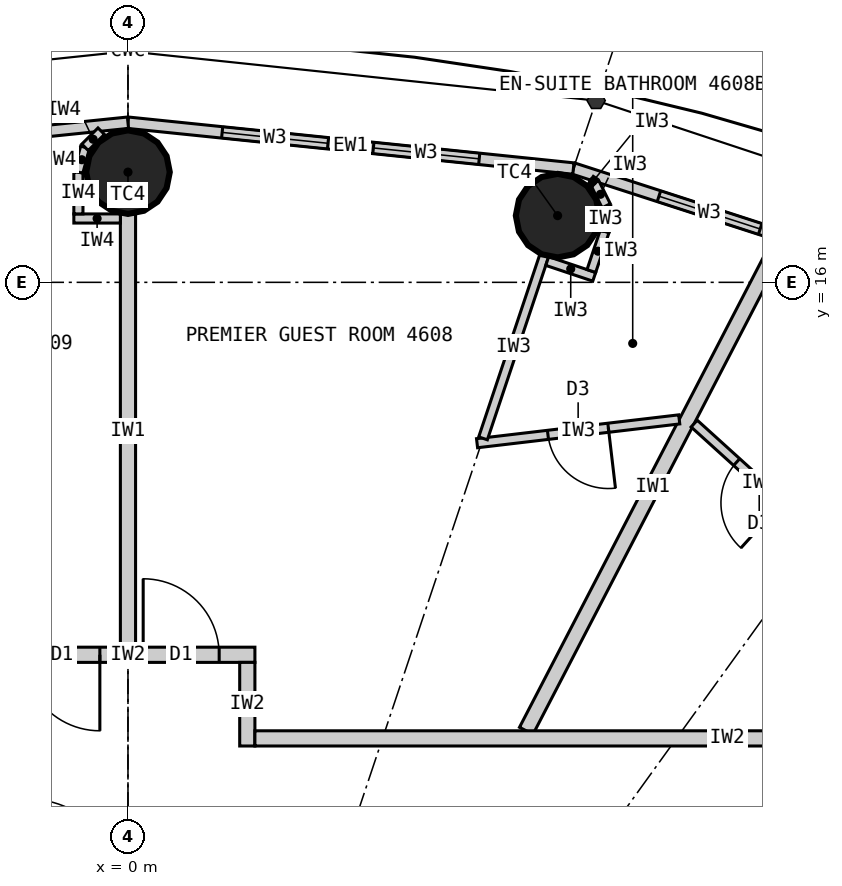
"""IFC4 building model, lengths in metres.
Left out: names, types, materials, properties, quantities, classifications, styles, units other than length and angle.
Written with IfcOpenShell. Run it as: python <this file> out.ifc"""

import sys

from ifc_helpers import new_model, si_unit, direction, frame, frame_2d, origin, origin_2d, place, context, subcontext, project, spatial, rectangle, circle, extrude, element, fill, save


model = new_model("IFC4")
c1 = context("Model", 3, precision=1e-05, world=origin(), true_north=direction((0.0, 1.0)))
c2 = subcontext(c1, "Body", "Model", "MODEL_VIEW")
j1 = project(units=[si_unit("LENGTHUNIT", "METRE"), si_unit("PLANEANGLEUNIT", "RADIAN")], contexts=[c1])
p1 = place(None, origin())
s1 = spatial("IfcSite", under=j1, at=p1, CompositionType="ELEMENT")
p2 = place(p1, origin())
s2 = spatial("IfcBuilding", under=s1, at=p2, CompositionType="ELEMENT")
p3 = place(p2, frame((0.0, 0.0, 173.1)))
s3 = spatial("IfcBuildingStorey", under=s2, at=p3, CompositionType="ELEMENT", Elevation=173.1)
for number, where, z_axis, x_axis in (
    (1, (5.653, 16.877, 0.0), (0.0, 0.0, 1.0), (1.0, 0.0, 0.0)),
    (2, (0.0, 17.45, 0.0), (0.0, 0.0, 1.0), (1.0, 0.0, 0.0)),
):
    element("IfcColumn", number, at=place(p3, frame(where, z_axis=z_axis, x_axis=x_axis)), inside=s3, PredefinedType="COLUMN", context=c2, shape_type="SweptSolid", body=[
        extrude(circle(Radius=0.55, at=origin_2d()), origin(), (0.0, 0.0, 1.0), 3.3),
    ])
p4 = place(p3, frame((11.346, 15.722, 0.0), z_axis=(0.0, 0.0, 1.0), x_axis=(-0.951432482129, 0.307857486429, 0.0)))
e3 = element("IfcWall", 3, at=p4, inside=s3, PredefinedType="ELEMENTEDWALL", context=c2, shape_type="SweptSolid", body=[
    extrude(rectangle(XDim=5.766, YDim=0.15, at=frame_2d((2.883, 0.0))), origin(), (0.0, 0.0, 1.0), 3.12),
])
p5 = place(p4, frame((1.183, 0.0, 0.9)))
e4 = element("IfcOpeningElement", 4, at=p5, cuts=e3, PredefinedType="OPENING", context=c2, shape_type="SweptSolid", body=[
    extrude(rectangle(XDim=1.4, YDim=1.9, at=frame_2d((0.7, 0.95))), frame((0.0, 0.085, 0.0), z_axis=(0.0, -1.0, 0.0), x_axis=(1.0, 0.0, 0.0)), (0.0, 0.0, 1.0), 0.17),
])
p6 = place(p4, frame((3.183, 0.0, 0.9)))
e5 = element("IfcOpeningElement", 5, at=p6, cuts=e3, PredefinedType="OPENING", context=c2, shape_type="SweptSolid", body=[
    extrude(rectangle(XDim=1.4, YDim=1.9, at=frame_2d((0.7, 0.95))), frame((0.0, 0.085, 0.0), z_axis=(0.0, -1.0, 0.0), x_axis=(1.0, 0.0, 0.0)), (0.0, 0.0, 1.0), 0.17),
])
p7 = place(p3, frame((5.86, 17.497, 0.0), z_axis=(0.0, 0.0, 1.0), x_axis=(-0.994751738032, 0.102318032045, 0.0)))
e6 = element("IfcWall", 6, at=p7, inside=s3, PredefinedType="ELEMENTEDWALL", context=c2, shape_type="SweptSolid", body=[
    extrude(rectangle(XDim=5.891, YDim=0.15, at=frame_2d((2.946, 0.0))), origin(), (0.0, 0.0, 1.0), 3.12),
])
p8 = place(p7, frame((1.246, 0.0, 0.9)))
e7 = element("IfcOpeningElement", 7, at=p8, cuts=e6, PredefinedType="OPENING", context=c2, shape_type="SweptSolid", body=[
    extrude(rectangle(XDim=1.4, YDim=1.9, at=frame_2d((0.7, 0.95))), frame((0.0, 0.085, 0.0), z_axis=(0.0, -1.0, 0.0), x_axis=(1.0, 0.0, 0.0)), (0.0, 0.0, 1.0), 0.17),
])
p9 = place(p7, frame((3.246, 0.0, 0.9)))
e8 = element("IfcOpeningElement", 8, at=p9, cuts=e6, PredefinedType="OPENING", context=c2, shape_type="SweptSolid", body=[
    extrude(rectangle(XDim=1.4, YDim=1.9, at=frame_2d((0.7, 0.95))), frame((0.0, 0.085, 0.0), z_axis=(0.0, -1.0, 0.0), x_axis=(1.0, 0.0, 0.0)), (0.0, 0.0, 1.0), 0.17),
])
p10 = place(p3, frame((0.0, 18.1, 0.0), z_axis=(0.0, 0.0, 1.0), x_axis=(-0.994751738032, -0.102318032045, 0.0)))
e9 = element("IfcWall", 9, at=p10, inside=s3, PredefinedType="ELEMENTEDWALL", context=c2, shape_type="SweptSolid", body=[
    extrude(rectangle(XDim=5.891, YDim=0.15, at=frame_2d((2.946, 0.0))), origin(), (0.0, 0.0, 1.0), 3.12),
])
p11 = place(p10, frame((1.246, 0.0, 0.9)))
e10 = element("IfcOpeningElement", 10, at=p11, cuts=e9, PredefinedType="OPENING", context=c2, shape_type="SweptSolid", body=[
    extrude(rectangle(XDim=1.4, YDim=1.9, at=frame_2d((0.7, 0.95))), frame((0.0, 0.085, 0.0), z_axis=(0.0, -1.0, 0.0), x_axis=(1.0, 0.0, 0.0)), (0.0, 0.0, 1.0), 0.17),
])
p12 = place(p10, frame((3.246, 0.0, 0.9)))
e11 = element("IfcOpeningElement", 11, at=p12, cuts=e9, PredefinedType="OPENING", context=c2, shape_type="SweptSolid", body=[
    extrude(rectangle(XDim=1.4, YDim=1.9, at=frame_2d((0.7, 0.95))), frame((0.0, 0.085, 0.0), z_axis=(0.0, -1.0, 0.0), x_axis=(1.0, 0.0, 0.0)), (0.0, 0.0, 1.0), 0.17),
])
p13 = place(p3, frame((5.24, 10.1, 0.0), z_axis=(0.0, 0.0, 1.0), x_axis=(0.460532965373, 0.887642601391, 0.0)))
e12 = element("IfcWall", 12, at=p13, inside=s3, PredefinedType="PARTITIONING", context=c2, shape_type="SweptSolid", body=[
    extrude(rectangle(XDim=7.231, YDim=0.2, at=frame_2d((3.616, 0.0))), origin(), (0.0, 0.0, 1.0), 3.12),
])
p14 = place(p3, frame((0.0, 11.2, 0.0), z_axis=(0.0, 0.0, 1.0), x_axis=(0.0, 1.0, 0.0)))
e13 = element("IfcWall", 13, at=p14, inside=s3, PredefinedType="PARTITIONING", context=c2, shape_type="SweptSolid", body=[
    extrude(rectangle(XDim=5.7, YDim=0.2, at=frame_2d((2.85, 0.0))), origin(), (0.0, 0.0, 1.0), 2.42),
])
p15 = place(p3, frame((-1.67, 11.1, 0.0), z_axis=(0.0, 0.0, 1.0), x_axis=(1.0, 0.0, 0.0)))
e14 = element("IfcWall", 14, at=p15, inside=s3, PredefinedType="PARTITIONING", context=c2, shape_type="SweptSolid", body=[
    extrude(rectangle(XDim=3.34, YDim=0.2, at=frame_2d((1.67, 0.0))), origin(), (0.0, 0.0, 1.0), 3.12),
])
p16 = place(p15, frame((1.87, 0.0, 0.0)))
e15 = element("IfcOpeningElement", 15, at=p16, cuts=e14, PredefinedType="OPENING", context=c2, shape_type="SweptSolid", body=[
    extrude(rectangle(XDim=1.0, YDim=2.2, at=frame_2d((0.5, 1.1))), frame((0.0, 0.11, 0.0), z_axis=(0.0, -1.0, 0.0), x_axis=(1.0, 0.0, 0.0)), (0.0, 0.0, 1.0), 0.22),
])
p17 = place(p15, frame((0.3, 0.0, 0.0)))
e16 = element("IfcOpeningElement", 16, at=p17, cuts=e14, PredefinedType="OPENING", context=c2, shape_type="SweptSolid", body=[
    extrude(rectangle(XDim=1.0, YDim=2.2, at=frame_2d((0.5, 1.1))), frame((0.0, 0.11, 0.0), z_axis=(0.0, -1.0, 0.0), x_axis=(1.0, 0.0, 0.0)), (0.0, 0.0, 1.0), 0.22),
])
p18 = place(p3, frame((1.57, 9.9, 0.0), z_axis=(0.0, 0.0, 1.0), x_axis=(0.0, 1.0, 0.0)))
e17 = element("IfcWall", 17, at=p18, inside=s3, PredefinedType="PARTITIONING", context=c2, shape_type="SweptSolid", body=[
    extrude(rectangle(XDim=1.1, YDim=0.2, at=frame_2d((0.55, 0.0))), origin(), (0.0, 0.0, 1.0), 3.12),
])
p19 = place(p3, frame((7.45, 14.142, 0.0), z_axis=(0.0, 0.0, 1.0), x_axis=(0.74113984586, -0.671350675041, 0.0)))
e18 = element("IfcWall", 18, at=p19, inside=s3, PredefinedType="PARTITIONING", context=c2, shape_type="SweptSolid", body=[
    extrude(rectangle(XDim=2.309, YDim=0.12, at=frame_2d((1.154, 0.0))), origin(), (0.0, 0.0, 1.0), 3.12),
])
p20 = place(p19, frame((0.754, 0.0, 0.0)))
e19 = element("IfcOpeningElement", 19, at=p20, cuts=e18, PredefinedType="OPENING", context=c2, shape_type="SweptSolid", body=[
    extrude(rectangle(XDim=0.8, YDim=2.1, at=frame_2d((0.4, 1.05))), frame((0.0, 0.07, 0.0), z_axis=(0.0, -1.0, 0.0), x_axis=(1.0, 0.0, 0.0)), (0.0, 0.0, 1.0), 0.14),
])
p21 = place(p3, frame((7.253, 14.197, 0.0), z_axis=(0.0, 0.0, 1.0), x_axis=(-0.993128188393, -0.117031625725, 0.0)))
e20 = element("IfcWall", 20, at=p21, inside=s3, PredefinedType="PARTITIONING", context=c2, shape_type="SweptSolid", body=[
    extrude(rectangle(XDim=2.678, YDim=0.12, at=frame_2d((1.339, 0.0))), origin(), (0.0, 0.0, 1.0), 3.12),
])
p22 = place(p21, frame((0.939, 0.0, 0.0)))
e21 = element("IfcOpeningElement", 21, at=p22, cuts=e20, PredefinedType="OPENING", context=c2, shape_type="SweptSolid", body=[
    extrude(rectangle(XDim=0.8, YDim=2.1, at=frame_2d((0.4, 1.05))), frame((0.0, 0.07, 0.0), z_axis=(0.0, -1.0, 0.0), x_axis=(1.0, 0.0, 0.0)), (0.0, 0.0, 1.0), 0.14),
])
p23 = place(p3, frame((4.671, 13.948, 0.0), z_axis=(0.0, 0.0, 1.0), x_axis=(0.317669167093, 0.948201613729, 0.0)))
e22 = element("IfcWall", 22, at=p23, inside=s3, PredefinedType="PARTITIONING", context=c2, shape_type="SweptSolid", body=[
    extrude(rectangle(XDim=2.54, YDim=0.12, at=frame_2d((1.27, 0.0))), origin(), (0.0, 0.0, 1.0), 2.42),
])
p24 = place(p3, frame((5.516, 16.28, 0.0), z_axis=(0.0, 0.0, 1.0), x_axis=(0.948157944392, -0.317799484717, 0.0)))
e23 = element("IfcWall", 23, at=p24, inside=s3, PredefinedType="PARTITIONING", context=c2, shape_type="SweptSolid", body=[
    extrude(rectangle(XDim=0.652, YDim=0.12, at=frame_2d((0.326, 0.0))), origin(), (0.0, 0.0, 1.0), 3.12),
])
p25 = place(p3, frame((6.097, 16.149, 0.0), z_axis=(0.0, 0.0, 1.0), x_axis=(0.317292604854, 0.948327687514, 0.0)))
e24 = element("IfcWall", 24, at=p25, inside=s3, PredefinedType="PARTITIONING", context=c2, shape_type="SweptSolid", body=[
    extrude(rectangle(XDim=0.55, YDim=0.12, at=frame_2d((0.275, 0.0))), origin(), (0.0, 0.0, 1.0), 3.12),
])
for number, where, z_axis, x_axis in (
    (25, (6.271, 16.67, 0.0), (0.0, 0.0, 1.0), (0.061, 0.998, 0.0)),
    (26, (6.292, 17.007, 0.0), (0.0, 0.0, 1.0), (-0.445, 0.895, 0.0)),
):
    element("IfcWall", number, at=place(p3, frame(where, z_axis=z_axis, x_axis=x_axis)), inside=s3, PredefinedType="PARTITIONING", context=c2, shape_type="SweptSolid", body=[
        extrude(rectangle(XDim=0.338, YDim=0.12, at=frame_2d((0.169, 0.0))), origin(), (0.0, 0.0, 1.0), 3.12),
    ])
p26 = place(p3, frame((6.142, 17.31, 0.0), z_axis=(0.0, 0.0, 1.0), x_axis=(-0.835039693181, 0.550189704386, 0.0)))
e27 = element("IfcWall", 27, at=p26, inside=s3, PredefinedType="PARTITIONING", context=c2, shape_type="SweptSolid", body=[
    extrude(rectangle(XDim=0.062, YDim=0.12, at=frame_2d((0.031, 0.0))), origin(), (0.0, 0.0, 1.0), 3.12),
])
p27 = place(p3, frame((1.67, 10.0, 0.0), z_axis=(0.0, 0.0, 1.0), x_axis=(1.0, 0.0, 0.0)))
e28 = element("IfcWall", 28, at=p27, inside=s3, PredefinedType="PARTITIONING", context=c2, shape_type="SweptSolid", body=[
    extrude(rectangle(XDim=12.43, YDim=0.2, at=frame_2d((6.215, 0.0))), origin(), (0.0, 0.0, 1.0), 3.12),
])
p28 = place(p27, frame((9.655, 0.0, 0.0)))
e29 = element("IfcOpeningElement", 29, at=p28, cuts=e28, PredefinedType="OPENING", context=c2, shape_type="SweptSolid", body=[
    extrude(rectangle(XDim=1.0, YDim=2.2, at=frame_2d((0.5, 1.1))), frame((0.0, 0.11, 0.0), z_axis=(0.0, -1.0, 0.0), x_axis=(1.0, 0.0, 0.0)), (0.0, 0.0, 1.0), 0.22),
])
p29 = place(p3, frame((-0.1, 16.84, 0.0), z_axis=(0.0, 0.0, 1.0), x_axis=(-1.0, 0.0, 0.0)))
e30 = element("IfcWall", 30, at=p29, inside=s3, PredefinedType="PARTITIONING", context=c2, shape_type="SweptSolid", body=[
    extrude(rectangle(XDim=0.612, YDim=0.12, at=frame_2d((0.306, 0.0))), origin(), (0.0, 0.0, 1.0), 3.12),
])
p30 = place(p3, frame((-0.652, 16.9, 0.0), z_axis=(0.0, 0.0, 1.0), x_axis=(0.0, 1.0, 0.0)))
e31 = element("IfcWall", 31, at=p30, inside=s3, PredefinedType="PARTITIONING", context=c2, shape_type="SweptSolid", body=[
    extrude(rectangle(XDim=0.55, YDim=0.12, at=frame_2d((0.275, 0.0))), origin(), (0.0, 0.0, 1.0), 3.12),
])
p31 = place(p3, frame((-0.652, 17.45, 0.0), z_axis=(0.0, 0.0, 1.0), x_axis=(0.258832454679, 0.965922233104, 0.0)))
e32 = element("IfcWall", 32, at=p31, inside=s3, PredefinedType="PARTITIONING", context=c2, shape_type="SweptSolid", body=[
    extrude(rectangle(XDim=0.338, YDim=0.12, at=frame_2d((0.169, 0.0))), origin(), (0.0, 0.0, 1.0), 3.12),
])
p32 = place(p3, frame((-0.565, 17.776, 0.0), z_axis=(0.0, 0.0, 1.0), x_axis=(0.707106781187, 0.707106781187, 0.0)))
e33 = element("IfcWall", 33, at=p32, inside=s3, PredefinedType="PARTITIONING", context=c2, shape_type="SweptSolid", body=[
    extrude(rectangle(XDim=0.301, YDim=0.12, at=frame_2d((0.15, 0.0))), origin(), (0.0, 0.0, 1.0), 3.12),
])
p33 = place(p6, origin())
e34 = element("IfcWindow", 34, at=p33, inside=s3, PartitioningType="SINGLE_PANEL", PredefinedType="WINDOW", context=c2, shape_type="SweptSolid", body=[
    extrude(rectangle(XDim=1.4, YDim=1.9, at=frame_2d((0.7, 0.95))), frame((0.0, 0.03, 0.0), z_axis=(0.0, -1.0, 0.0), x_axis=(1.0, 0.0, 0.0)), (0.0, 0.0, 1.0), 0.06),
])
fill(e5, e34)
p34 = place(p8, origin())
e35 = element("IfcWindow", 35, at=p34, inside=s3, PartitioningType="SINGLE_PANEL", PredefinedType="WINDOW", context=c2, shape_type="SweptSolid", body=[
    extrude(rectangle(XDim=1.4, YDim=1.9, at=frame_2d((0.7, 0.95))), frame((0.0, 0.03, 0.0), z_axis=(0.0, -1.0, 0.0), x_axis=(1.0, 0.0, 0.0)), (0.0, 0.0, 1.0), 0.06),
])
fill(e7, e35)
p35 = place(p9, origin())
e36 = element("IfcWindow", 36, at=p35, inside=s3, PartitioningType="SINGLE_PANEL", PredefinedType="WINDOW", context=c2, shape_type="SweptSolid", body=[
    extrude(rectangle(XDim=1.4, YDim=1.9, at=frame_2d((0.7, 0.95))), frame((0.0, 0.03, 0.0), z_axis=(0.0, -1.0, 0.0), x_axis=(1.0, 0.0, 0.0)), (0.0, 0.0, 1.0), 0.06),
])
fill(e8, e36)
p36 = place(p20, origin())
e37 = element("IfcDoor", 37, at=p36, inside=s3, OperationType="SINGLE_SWING_RIGHT", PredefinedType="DOOR", context=c2, shape_type="SweptSolid", body=[
    extrude(rectangle(XDim=0.8, YDim=2.1, at=frame_2d((0.4, 1.05))), frame((0.0, 0.025, 0.0), z_axis=(0.0, -1.0, 0.0), x_axis=(1.0, 0.0, 0.0)), (0.0, 0.0, 1.0), 0.05),
])
fill(e19, e37)
p37 = place(p22, origin())
e38 = element("IfcDoor", 38, at=p37, inside=s3, OperationType="SINGLE_SWING_LEFT", PredefinedType="DOOR", context=c2, shape_type="SweptSolid", body=[
    extrude(rectangle(XDim=0.8, YDim=2.1, at=frame_2d((0.4, 1.05))), frame((0.0, 0.025, 0.0), z_axis=(0.0, -1.0, 0.0), x_axis=(1.0, 0.0, 0.0)), (0.0, 0.0, 1.0), 0.05),
])
fill(e21, e38)
p38 = place(p16, origin())
e39 = element("IfcDoor", 39, at=p38, inside=s3, OperationType="SINGLE_SWING_LEFT", PredefinedType="DOOR", context=c2, shape_type="SweptSolid", body=[
    extrude(rectangle(XDim=1.0, YDim=2.2, at=frame_2d((0.5, 1.1))), frame((0.0, 0.025, 0.0), z_axis=(0.0, -1.0, 0.0), x_axis=(1.0, 0.0, 0.0)), (0.0, 0.0, 1.0), 0.05),
])
fill(e15, e39)
p39 = place(p17, origin())
e40 = element("IfcDoor", 40, at=p39, inside=s3, OperationType="SINGLE_SWING_RIGHT", PredefinedType="DOOR", context=c2, shape_type="SweptSolid", body=[
    extrude(rectangle(XDim=1.0, YDim=2.2, at=frame_2d((0.5, 1.1))), frame((0.0, 0.025, 0.0), z_axis=(0.0, -1.0, 0.0), x_axis=(1.0, 0.0, 0.0)), (0.0, 0.0, 1.0), 0.05),
])
fill(e16, e40)
save(model, sys.argv[1])
